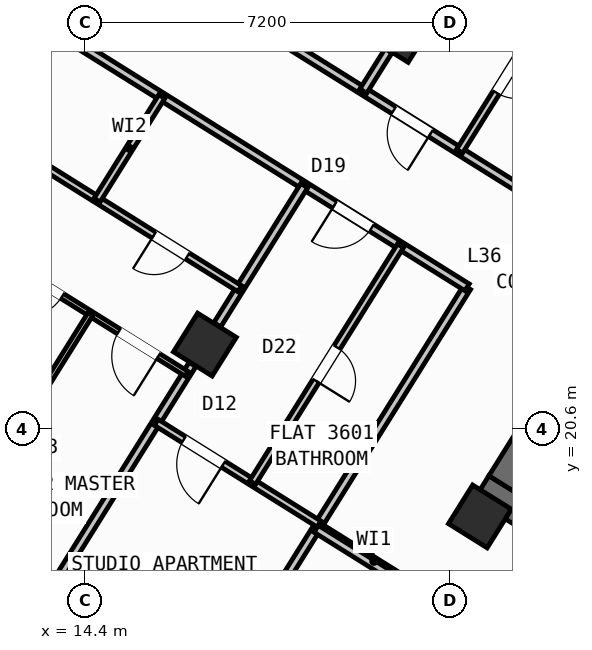
"""IFC4 building model, lengths in metres.
Left out: names, types, materials, properties, quantities, classifications, styles, units other than length and angle.
Written with IfcOpenShell. Run it as: python <this file> out.ifc"""

import sys

from ifc_helpers import new_model, si_unit, direction, frame, frame_2d, origin, origin_2d, place, context, subcontext, project, spatial, rectangle, hollow_rectangle, extrude, source, transform, mapped, element, fill, save


model = new_model("IFC4")
c1 = context("Model", 3, precision=1e-05, world=origin(), true_north=direction((0.0, 1.0)))
c2 = subcontext(c1, "Body", "Model", "MODEL_VIEW")
j1 = project(units=[si_unit("LENGTHUNIT", "METRE"), si_unit("PLANEANGLEUNIT", "RADIAN")], contexts=[c1])
p1 = place(None, origin())
s1 = spatial("IfcSite", under=j1, at=p1, CompositionType="ELEMENT")
p2 = place(p1, origin())
s2 = spatial("IfcBuilding", under=s1, at=p2, CompositionType="ELEMENT")
p3 = place(p2, frame((0.0, 0.0, 144.3)))
s3 = spatial("IfcBuildingStorey", under=s2, at=p3, CompositionType="ELEMENT", Elevation=144.3)
p4 = place(p3, frame((33.366, 12.477, 0.0), z_axis=(0.0, 0.0, 1.0), x_axis=(-0.848047359947, 0.529920442413, 0.0)))
e1 = element("IfcWall", 1, at=p4, inside=s3, PredefinedType="SHEAR", context=c2, shape_type="SweptSolid", body=[
    extrude(rectangle(XDim=13.14, YDim=0.55, at=frame_2d((6.57, 0.0))), origin(), (0.0, 0.0, 1.0), 3.35),
])
p5 = place(p3, frame((26.007, 24.976, 0.0), z_axis=(0.0, 0.0, 1.0), x_axis=(-0.529923795287, -0.848045264823, 0.0)))
e2 = element("IfcWall", 2, at=p5, inside=s3, PredefinedType="SHEAR", context=c2, shape_type="SweptSolid", body=[
    extrude(rectangle(XDim=6.425, YDim=0.55, at=frame_2d((3.212, 0.0))), origin(), (0.0, 0.0, 1.0), 3.35),
])
m1 = source(origin(), c2, "Body", "SweptSolid", [
    extrude(hollow_rectangle(XDim=0.9, YDim=0.9, WallThickness=0.036, at=origin_2d()), origin(), (0.0, 0.0, 1.0), 3.6),
])
for number, where, z_axis, x_axis in (
    (3, (22.191, 18.87, 0.0), (0.0, 0.0, 1.0), (-0.848, 0.53, 0.0)),
    (4, (20.632, 28.452, 0.0), (0.0, 0.0, 1.0), (-0.848, 0.53, 0.0)),
    (5, (16.764, 22.261, 0.0), (0.0, 0.0, 1.0), (-0.848, 0.53, 0.0)),
):
    element("IfcColumn", number, at=place(p3, frame(where, z_axis=z_axis, x_axis=x_axis)), inside=s3, PredefinedType="COLUMN", context=c2, shape_type="MappedRepresentation", body=[
        mapped(m1, transform((0.0, 0.0, 0.0), scale=1.0)),
    ])
p6 = place(p3, frame((29.268, 6.429, 0.0), z_axis=(0.0, 0.0, 1.0), x_axis=(-0.848049971435, 0.529916263149, 0.0)))
e6 = element("IfcWall", 6, at=p6, inside=s3, PredefinedType="STANDARD", context=c2, shape_type="SweptSolid", body=[
    extrude(rectangle(XDim=31.588, YDim=0.32, at=frame_2d((15.794, 0.0))), origin(), (0.0, 0.0, 1.0), 3.35),
])
p7 = place(p6, frame((16.362, 0.0, 0.0)))
e7 = element("IfcOpeningElement", 7, at=p7, cuts=e6, PredefinedType="OPENING", context=c2, shape_type="SweptSolid", body=[
    extrude(rectangle(XDim=1.2, YDim=2.15, at=frame_2d((0.6, 1.075))), frame((0.0, 0.17, 0.0), z_axis=(0.0, -1.0, 0.0), x_axis=(1.0, 0.0, 0.0)), (0.0, 0.0, 1.0), 0.34),
])
p8 = place(p6, frame((2.989, 0.0, 0.8)))
e8 = element("IfcOpeningElement", 8, at=p8, cuts=e6, PredefinedType="OPENING", context=c2, shape_type="SweptSolid", body=[
    extrude(rectangle(XDim=2.1, YDim=1.55, at=frame_2d((1.05, 0.775))), frame((0.0, 0.17, 0.0), z_axis=(0.0, -1.0, 0.0), x_axis=(1.0, 0.0, 0.0)), (0.0, 0.0, 1.0), 0.34),
])
p9 = place(p6, frame((8.359, 0.0, 0.8)))
e9 = element("IfcOpeningElement", 9, at=p9, cuts=e6, PredefinedType="OPENING", context=c2, shape_type="SweptSolid", body=[
    extrude(rectangle(XDim=2.1, YDim=1.55, at=frame_2d((1.05, 0.775))), frame((0.0, 0.17, 0.0), z_axis=(0.0, -1.0, 0.0), x_axis=(1.0, 0.0, 0.0)), (0.0, 0.0, 1.0), 0.34),
])
p10 = place(p6, frame((13.284, 0.0, 0.95)))
e10 = element("IfcOpeningElement", 10, at=p10, cuts=e6, PredefinedType="OPENING", context=c2, shape_type="SweptSolid", body=[
    extrude(rectangle(XDim=1.2, YDim=1.4, at=frame_2d((0.6, 0.7))), frame((0.0, 0.17, 0.0), z_axis=(0.0, -1.0, 0.0), x_axis=(1.0, 0.0, 0.0)), (0.0, 0.0, 1.0), 0.34),
])
p11 = place(p6, frame((29.188, 0.0, 0.95)))
e11 = element("IfcOpeningElement", 11, at=p11, cuts=e6, PredefinedType="OPENING", context=c2, shape_type="SweptSolid", body=[
    extrude(rectangle(XDim=1.2, YDim=1.4, at=frame_2d((0.6, 0.7))), frame((0.0, 0.17, 0.0), z_axis=(0.0, -1.0, 0.0), x_axis=(1.0, 0.0, 0.0)), (0.0, 0.0, 1.0), 0.34),
])
p12 = place(p6, frame((19.674, 0.0, 1.0)))
e12 = element("IfcOpeningElement", 12, at=p12, cuts=e6, PredefinedType="OPENING", context=c2, shape_type="SweptSolid", body=[
    extrude(rectangle(XDim=0.9, YDim=1.25, at=frame_2d((0.45, 0.625))), frame((0.0, 0.17, 0.0), z_axis=(0.0, -1.0, 0.0), x_axis=(1.0, 0.0, 0.0)), (0.0, 0.0, 1.0), 0.34),
])
p13 = place(p6, frame((21.896, 0.0, 1.0)))
e13 = element("IfcOpeningElement", 13, at=p13, cuts=e6, PredefinedType="OPENING", context=c2, shape_type="SweptSolid", body=[
    extrude(rectangle(XDim=0.9, YDim=1.25, at=frame_2d((0.45, 0.625))), frame((0.0, 0.17, 0.0), z_axis=(0.0, -1.0, 0.0), x_axis=(1.0, 0.0, 0.0)), (0.0, 0.0, 1.0), 0.34),
])
p14 = place(p6, frame((24.106, 0.0, 1.0)))
e14 = element("IfcOpeningElement", 14, at=p14, cuts=e6, PredefinedType="OPENING", context=c2, shape_type="SweptSolid", body=[
    extrude(rectangle(XDim=0.65, YDim=1.15, at=frame_2d((0.325, 0.575))), frame((0.0, 0.17, 0.0), z_axis=(0.0, -1.0, 0.0), x_axis=(1.0, 0.0, 0.0)), (0.0, 0.0, 1.0), 0.34),
])
p15 = place(p6, frame((26.366, 0.0, 1.0)))
e15 = element("IfcOpeningElement", 15, at=p15, cuts=e6, PredefinedType="OPENING", context=c2, shape_type="SweptSolid", body=[
    extrude(rectangle(XDim=0.9, YDim=1.25, at=frame_2d((0.45, 0.625))), frame((0.0, 0.17, 0.0), z_axis=(0.0, -1.0, 0.0), x_axis=(1.0, 0.0, 0.0)), (0.0, 0.0, 1.0), 0.34),
])
p16 = place(p3, frame((2.415, 23.452, 0.0), z_axis=(0.0, 0.0, 1.0), x_axis=(0.52991049553, 0.848053575387, 0.0)))
e16 = element("IfcWall", 16, at=p16, inside=s3, PredefinedType="STANDARD", context=c2, shape_type="SweptSolid", body=[
    extrude(rectangle(XDim=21.587, YDim=0.32, at=frame_2d((10.794, 0.0))), origin(), (0.0, 0.0, 1.0), 2.775),
])
p17 = place(p16, frame((2.356, 0.0, 0.8)))
e17 = element("IfcOpeningElement", 17, at=p17, cuts=e16, PredefinedType="OPENING", context=c2, shape_type="SweptSolid", body=[
    extrude(rectangle(XDim=2.1, YDim=1.55, at=frame_2d((1.05, 0.775))), frame((0.0, 0.17, 0.0), z_axis=(0.0, -1.0, 0.0), x_axis=(1.0, 0.0, 0.0)), (0.0, 0.0, 1.0), 0.34),
])
p18 = place(p16, frame((8.639, 0.0, 1.0)))
e18 = element("IfcOpeningElement", 18, at=p18, cuts=e16, PredefinedType="OPENING", context=c2, shape_type="SweptSolid", body=[
    extrude(rectangle(XDim=0.9, YDim=1.25, at=frame_2d((0.45, 0.625))), frame((0.0, 0.17, 0.0), z_axis=(0.0, -1.0, 0.0), x_axis=(1.0, 0.0, 0.0)), (0.0, 0.0, 1.0), 0.34),
])
p19 = place(p16, frame((17.744, 0.0, 0.85)))
e19 = element("IfcOpeningElement", 19, at=p19, cuts=e16, PredefinedType="OPENING", context=c2, shape_type="SweptSolid", body=[
    extrude(rectangle(XDim=1.5, YDim=1.5, at=frame_2d((0.75, 0.75))), frame((0.0, 0.17, 0.0), z_axis=(0.0, -1.0, 0.0), x_axis=(1.0, 0.0, 0.0)), (0.0, 0.0, 1.0), 0.34),
])
p20 = place(p3, frame((14.138, 41.825, 0.0), z_axis=(0.0, 0.0, 1.0), x_axis=(0.848046498049, -0.529921821731, 0.0)))
e20 = element("IfcWall", 20, at=p20, inside=s3, PredefinedType="STANDARD", context=c2, shape_type="SweptSolid", body=[
    extrude(rectangle(XDim=31.588, YDim=0.32, at=frame_2d((15.794, 0.0))), origin(), (0.0, 0.0, 1.0), 3.35),
])
p21 = place(p20, frame((2.949, 0.0, 0.0)))
e21 = element("IfcOpeningElement", 21, at=p21, cuts=e20, PredefinedType="OPENING", context=c2, shape_type="SweptSolid", body=[
    extrude(rectangle(XDim=1.05, YDim=2.15, at=frame_2d((0.525, 1.075))), frame((0.0, 0.17, 0.0), z_axis=(0.0, -1.0, 0.0), x_axis=(1.0, 0.0, 0.0)), (0.0, 0.0, 1.0), 0.34),
])
p22 = place(p20, frame((0.861, 0.0, 0.85)))
e22 = element("IfcOpeningElement", 22, at=p22, cuts=e20, PredefinedType="OPENING", context=c2, shape_type="SweptSolid", body=[
    extrude(rectangle(XDim=1.5, YDim=1.5, at=frame_2d((0.75, 0.75))), frame((0.0, 0.17, 0.0), z_axis=(0.0, -1.0, 0.0), x_axis=(1.0, 0.0, 0.0)), (0.0, 0.0, 1.0), 0.34),
])
p23 = place(p20, frame((8.494, 0.0, 0.85)))
e23 = element("IfcOpeningElement", 23, at=p23, cuts=e20, PredefinedType="OPENING", context=c2, shape_type="SweptSolid", body=[
    extrude(rectangle(XDim=1.8, YDim=1.5, at=frame_2d((0.9, 0.75))), frame((0.0, 0.17, 0.0), z_axis=(0.0, -1.0, 0.0), x_axis=(1.0, 0.0, 0.0)), (0.0, 0.0, 1.0), 0.34),
])
p24 = place(p20, frame((13.874, 0.0, 0.85)))
e24 = element("IfcOpeningElement", 24, at=p24, cuts=e20, PredefinedType="OPENING", context=c2, shape_type="SweptSolid", body=[
    extrude(rectangle(XDim=1.5, YDim=1.5, at=frame_2d((0.75, 0.75))), frame((0.0, 0.17, 0.0), z_axis=(0.0, -1.0, 0.0), x_axis=(1.0, 0.0, 0.0)), (0.0, 0.0, 1.0), 0.34),
])
p25 = place(p20, frame((17.104, 0.0, 1.0)))
e25 = element("IfcOpeningElement", 25, at=p25, cuts=e20, PredefinedType="OPENING", context=c2, shape_type="SweptSolid", body=[
    extrude(rectangle(XDim=0.9, YDim=1.25, at=frame_2d((0.45, 0.625))), frame((0.0, 0.17, 0.0), z_axis=(0.0, -1.0, 0.0), x_axis=(1.0, 0.0, 0.0)), (0.0, 0.0, 1.0), 0.34),
])
p26 = place(p20, frame((22.144, 0.0, 1.0)))
e26 = element("IfcOpeningElement", 26, at=p26, cuts=e20, PredefinedType="OPENING", context=c2, shape_type="SweptSolid", body=[
    extrude(rectangle(XDim=0.9, YDim=1.25, at=frame_2d((0.45, 0.625))), frame((0.0, 0.17, 0.0), z_axis=(0.0, -1.0, 0.0), x_axis=(1.0, 0.0, 0.0)), (0.0, 0.0, 1.0), 0.34),
])
p27 = place(p20, frame((27.744, 0.0, 1.0)))
e27 = element("IfcOpeningElement", 27, at=p27, cuts=e20, PredefinedType="OPENING", context=c2, shape_type="SweptSolid", body=[
    extrude(rectangle(XDim=0.9, YDim=1.25, at=frame_2d((0.45, 0.625))), frame((0.0, 0.17, 0.0), z_axis=(0.0, -1.0, 0.0), x_axis=(1.0, 0.0, 0.0)), (0.0, 0.0, 1.0), 0.34),
])
p28 = place(p3, frame((21.206, 17.292, 0.0), z_axis=(0.0, 0.0, 1.0), x_axis=(-0.848050851465, 0.529914854792, 0.0)))
e28 = element("IfcWall", 28, at=p28, inside=s3, PredefinedType="PARTITIONING", context=c2, shape_type="SweptSolid", body=[
    extrude(rectangle(XDim=2.61, YDim=0.16, at=frame_2d((1.305, 0.0))), origin(), (0.0, 0.0, 1.0), 3.34),
])
p29 = place(p3, frame((21.938, 23.391, 0.0), z_axis=(0.0, 0.0, 1.0), x_axis=(-0.529924725692, -0.848044683434, 0.0)))
e29 = element("IfcWall", 29, at=p29, inside=s3, PredefinedType="PARTITIONING", context=c2, shape_type="SweptSolid", body=[
    extrude(rectangle(XDim=10.35, YDim=0.16, at=frame_2d((5.175, 0.0))), origin(), (0.0, 0.0, 1.0), 3.34),
])
p30 = place(p3, frame((23.104, 25.256, 0.0), z_axis=(0.0, 0.0, 1.0), x_axis=(-0.848041752158, 0.529929416617, 0.0)))
e30 = element("IfcWall", 30, at=p30, inside=s3, PredefinedType="PARTITIONING", context=c2, shape_type="SweptSolid", body=[
    extrude(rectangle(XDim=16.73, YDim=0.16, at=frame_2d((8.365, 0.0))), origin(), (0.0, 0.0, 1.0), 3.34),
])
p31 = place(p30, frame((2.22, 0.0, 0.0)))
e31 = element("IfcOpeningElement", 31, at=p31, cuts=e30, PredefinedType="OPENING", context=c2, shape_type="SweptSolid", body=[
    extrude(rectangle(XDim=0.86, YDim=2.05, at=frame_2d((0.43, 1.025))), frame((0.0, 0.09, 0.0), z_axis=(0.0, -1.0, 0.0), x_axis=(1.0, 0.0, 0.0)), (0.0, 0.0, 1.0), 0.18),
])
p32 = place(p30, frame((12.084, 0.0, 0.0)))
e32 = element("IfcOpeningElement", 32, at=p32, cuts=e30, PredefinedType="OPENING", context=c2, shape_type="SweptSolid", body=[
    extrude(rectangle(XDim=1.0, YDim=2.1, at=frame_2d((0.5, 1.05))), frame((0.0, 0.09, 0.0), z_axis=(0.0, -1.0, 0.0), x_axis=(1.0, 0.0, 0.0)), (0.0, 0.0, 1.0), 0.18),
])
p33 = place(p3, frame((21.938, 23.391, 0.0), z_axis=(0.0, 0.0, 1.0), x_axis=(-0.848045850158, 0.529922858565, 0.0)))
e33 = element("IfcWall", 33, at=p33, inside=s3, PredefinedType="PARTITIONING", context=c2, shape_type="SweptSolid", body=[
    extrude(rectangle(XDim=16.73, YDim=0.16, at=frame_2d((8.365, 0.0))), origin(), (0.0, 0.0, 1.0), 3.34),
])
p34 = place(p33, frame((2.22, 0.0, 0.0)))
e34 = element("IfcOpeningElement", 34, at=p34, cuts=e33, PredefinedType="OPENING", context=c2, shape_type="SweptSolid", body=[
    extrude(rectangle(XDim=0.86, YDim=2.05, at=frame_2d((0.43, 1.025))), frame((0.0, 0.09, 0.0), z_axis=(0.0, -1.0, 0.0), x_axis=(1.0, 0.0, 0.0)), (0.0, 0.0, 1.0), 0.18),
])
p35 = place(p33, frame((14.22, 0.0, 0.0)))
e35 = element("IfcOpeningElement", 35, at=p35, cuts=e33, PredefinedType="OPENING", context=c2, shape_type="SweptSolid", body=[
    extrude(rectangle(XDim=1.0, YDim=2.1, at=frame_2d((0.5, 1.05))), frame((0.0, 0.09, 0.0), z_axis=(0.0, -1.0, 0.0), x_axis=(1.0, 0.0, 0.0)), (0.0, 0.0, 1.0), 0.18),
])
p36 = place(p3, frame((18.724, 25.399, 0.0), z_axis=(0.0, 0.0, 1.0), x_axis=(-0.529890499457, -0.848066069705, 0.0)))
e36 = element("IfcWall", 36, at=p36, inside=s3, PredefinedType="PARTITIONING", context=c2, shape_type="SweptSolid", body=[
    extrude(rectangle(XDim=3.238, YDim=0.16, at=frame_2d((1.619, 0.0))), origin(), (0.0, 0.0, 1.0), 2.775),
])
p37 = place(p3, frame((16.519, 21.87, 0.0), z_axis=(0.0, 0.0, 1.0), x_axis=(-0.529922447305, -0.848046107144, 0.0)))
e37 = element("IfcWall", 37, at=p37, inside=s3, PredefinedType="PARTITIONING", context=c2, shape_type="SweptSolid", body=[
    extrude(rectangle(XDim=5.451, YDim=0.16, at=frame_2d((2.726, 0.0))), origin(), (0.0, 0.0, 1.0), 2.775),
])
p38 = place(p3, frame((19.019, 18.718, 0.0), z_axis=(0.0, 0.0, 1.0), x_axis=(-0.848059820872, 0.529900500304, 0.0)))
e38 = element("IfcWall", 38, at=p38, inside=s3, PredefinedType="PLUMBINGWALL", context=c2, shape_type="SweptSolid", body=[
    extrude(rectangle(XDim=3.79, YDim=0.14, at=frame_2d((1.895, 0.0))), origin(), (0.0, 0.0, 1.0), 3.34),
])
p39 = place(p38, frame((2.23, 0.0, 0.0)))
e39 = element("IfcOpeningElement", 39, at=p39, cuts=e38, PredefinedType="OPENING", context=c2, shape_type="SweptSolid", body=[
    extrude(rectangle(XDim=0.92, YDim=2.08, at=frame_2d((0.46, 1.04))), frame((0.0, 0.08, 0.0), z_axis=(0.0, -1.0, 0.0), x_axis=(1.0, 0.0, 0.0)), (0.0, 0.0, 1.0), 0.16),
])
p40 = place(p3, frame((20.624, 24.212, 0.0), z_axis=(0.0, 0.0, 1.0), x_axis=(-0.529919283494, -0.848048084121, 0.0)))
e40 = element("IfcWall", 40, at=p40, inside=s3, PredefinedType="PLUMBINGWALL", context=c2, shape_type="SweptSolid", body=[
    extrude(rectangle(XDim=5.51, YDim=0.14, at=frame_2d((2.755, 0.0))), origin(), (0.0, 0.0, 1.0), 2.995),
])
p41 = place(p40, frame((2.365, 0.0, 0.0)))
e41 = element("IfcOpeningElement", 41, at=p41, cuts=e40, PredefinedType="OPENING", context=c2, shape_type="SweptSolid", body=[
    extrude(rectangle(XDim=0.78, YDim=2.05, at=frame_2d((0.39, 1.025))), frame((0.0, 0.08, 0.0), z_axis=(0.0, -1.0, 0.0), x_axis=(1.0, 0.0, 0.0)), (0.0, 0.0, 1.0), 0.16),
])
p42 = place(p3, frame((17.452, 23.364, 0.0), z_axis=(0.0, 0.0, 1.0), x_axis=(-0.848044326704, 0.52992529657, 0.0)))
e42 = element("IfcWall", 42, at=p42, inside=s3, PredefinedType="PLUMBINGWALL", context=c2, shape_type="SweptSolid", body=[
    extrude(rectangle(XDim=8.94, YDim=0.14, at=frame_2d((4.47, 0.0))), origin(), (0.0, 0.0, 1.0), 3.34),
])
p43 = place(p42, frame((5.087, 0.0, 0.0)))
e43 = element("IfcOpeningElement", 43, at=p43, cuts=e42, PredefinedType="OPENING", context=c2, shape_type="SweptSolid", body=[
    extrude(rectangle(XDim=0.78, YDim=2.05, at=frame_2d((0.39, 1.025))), frame((0.0, 0.08, 0.0), z_axis=(0.0, -1.0, 0.0), x_axis=(1.0, 0.0, 0.0)), (0.0, 0.0, 1.0), 0.16),
])
p44 = place(p42, frame((1.218, 0.0, 0.0)))
e44 = element("IfcOpeningElement", 44, at=p44, cuts=e42, PredefinedType="OPENING", context=c2, shape_type="SweptSolid", body=[
    extrude(rectangle(XDim=0.78, YDim=2.05, at=frame_2d((0.39, 1.025))), frame((0.0, 0.08, 0.0), z_axis=(0.0, -1.0, 0.0), x_axis=(1.0, 0.0, 0.0)), (0.0, 0.0, 1.0), 0.16),
])
p45 = place(p3, frame((15.913, 27.156, 0.0), z_axis=(0.0, 0.0, 1.0), x_axis=(-0.529935194983, -0.848038141311, 0.0)))
e45 = element("IfcWall", 45, at=p45, inside=s3, PredefinedType="PLUMBINGWALL", context=c2, shape_type="SweptSolid", body=[
    extrude(rectangle(XDim=2.41, YDim=0.14, at=frame_2d((1.205, 0.0))), origin(), (0.0, 0.0, 1.0), 3.34),
])
p46 = place(p3, frame((16.403, 21.685, 0.0), z_axis=(0.0, 0.0, 1.0), x_axis=(-0.848044326704, 0.52992529657, 0.0)))
e46 = element("IfcWall", 46, at=p46, inside=s3, PredefinedType="PARTITIONING", context=c2, shape_type="SweptSolid", body=[
    extrude(rectangle(XDim=8.94, YDim=0.11, at=frame_2d((4.47, 0.0))), origin(), (0.0, 0.0, 1.0), 3.34),
])
p47 = place(p46, frame((0.657, 0.0, 0.0)))
e47 = element("IfcOpeningElement", 47, at=p47, cuts=e46, PredefinedType="OPENING", context=c2, shape_type="SweptSolid", body=[
    extrude(rectangle(XDim=0.92, YDim=2.08, at=frame_2d((0.46, 1.04))), frame((0.0, 0.065, 0.0), z_axis=(0.0, -1.0, 0.0), x_axis=(1.0, 0.0, 0.0)), (0.0, 0.0, 1.0), 0.13),
])
p48 = place(p46, frame((2.893, 0.0, 0.0)))
e48 = element("IfcOpeningElement", 48, at=p48, cuts=e46, PredefinedType="OPENING", context=c2, shape_type="SweptSolid", body=[
    extrude(rectangle(XDim=0.92, YDim=2.08, at=frame_2d((0.46, 1.04))), frame((0.0, 0.065, 0.0), z_axis=(0.0, -1.0, 0.0), x_axis=(1.0, 0.0, 0.0)), (0.0, 0.0, 1.0), 0.13),
])
p49 = place(p46, frame((5.008, 0.0, 0.0)))
e49 = element("IfcOpeningElement", 49, at=p49, cuts=e46, PredefinedType="OPENING", context=c2, shape_type="SweptSolid", body=[
    extrude(rectangle(XDim=0.92, YDim=2.08, at=frame_2d((0.46, 1.04))), frame((0.0, 0.065, 0.0), z_axis=(0.0, -1.0, 0.0), x_axis=(1.0, 0.0, 0.0)), (0.0, 0.0, 1.0), 0.13),
])
p50 = place(p46, frame((7.363, 0.0, 0.0)))
e50 = element("IfcOpeningElement", 50, at=p50, cuts=e46, PredefinedType="OPENING", context=c2, shape_type="SweptSolid", body=[
    extrude(rectangle(XDim=0.92, YDim=2.08, at=frame_2d((0.46, 1.04))), frame((0.0, 0.065, 0.0), z_axis=(0.0, -1.0, 0.0), x_axis=(1.0, 0.0, 0.0)), (0.0, 0.0, 1.0), 0.13),
])
p51 = place(p3, frame((14.508, 22.869, 0.0), z_axis=(0.0, 0.0, 1.0), x_axis=(-0.529900466106, -0.848059842241, 0.0)))
e51 = element("IfcWall", 51, at=p51, inside=s3, PredefinedType="PARTITIONING", context=c2, shape_type="SweptSolid", body=[
    extrude(rectangle(XDim=6.24, YDim=0.11, at=frame_2d((3.12, 0.0))), origin(), (0.0, 0.0, 1.0), 2.995),
])
p52 = place(p3, frame((20.387, 28.06, 0.0), z_axis=(0.0, 0.0, 1.0), x_axis=(-0.529952145338, -0.848027548876, 0.0)))
e52 = element("IfcWall", 52, at=p52, inside=s3, PredefinedType="PARTITIONING", context=c2, shape_type="SweptSolid", body=[
    extrude(rectangle(XDim=0.938, YDim=0.16, at=frame_2d((0.469, 0.0))), origin(), (0.0, 0.0, 1.0), 2.775),
])
p53 = place(p3, frame((23.65, 29.054, 0.0), z_axis=(0.0, 0.0, 1.0), x_axis=(-0.529898896701, -0.848060822863, 0.0)))
e53 = element("IfcWall", 53, at=p53, inside=s3, PredefinedType="PLUMBINGWALL", context=c2, shape_type="SweptSolid", body=[
    extrude(rectangle(XDim=3.51, YDim=0.14, at=frame_2d((1.755, 0.0))), origin(), (0.0, 0.0, 1.0), 2.995),
])
p54 = place(p53, frame((1.365, 0.0, 0.0)))
e54 = element("IfcOpeningElement", 54, at=p54, cuts=e53, PredefinedType="OPENING", context=c2, shape_type="SweptSolid", body=[
    extrude(rectangle(XDim=0.78, YDim=2.05, at=frame_2d((0.39, 1.025))), frame((0.0, 0.08, 0.0), z_axis=(0.0, -1.0, 0.0), x_axis=(1.0, 0.0, 0.0)), (0.0, 0.0, 1.0), 0.16),
])
p55 = place(p3, frame((32.164, 10.374, 0.0), z_axis=(0.0, 0.0, 1.0), x_axis=(-0.848044107957, 0.529925646633, 0.0)))
e55 = element("IfcWall", 55, at=p55, inside=s3, PredefinedType="PARTITIONING", context=c2, shape_type="SweptSolid", body=[
    extrude(rectangle(XDim=15.57, YDim=0.16, at=frame_2d((7.785, 0.0))), origin(), (0.0, 0.0, 1.0), 3.34),
])
p56 = place(p55, frame((10.83, 0.0, 0.0)))
e56 = element("IfcOpeningElement", 56, at=p56, cuts=e55, PredefinedType="OPENING", context=c2, shape_type="SweptSolid", body=[
    extrude(rectangle(XDim=1.0, YDim=2.1, at=frame_2d((0.5, 1.05))), frame((0.0, 0.09, 0.0), z_axis=(0.0, -1.0, 0.0), x_axis=(1.0, 0.0, 0.0)), (0.0, 0.0, 1.0), 0.18),
])
m2 = source(origin(), c2, "Body", "SweptSolid", [
    extrude(rectangle(XDim=0.86, YDim=2.05, at=frame_2d((0.43, 1.025))), frame((0.0, 0.025, 0.0), z_axis=(0.0, -1.0, 0.0), x_axis=(1.0, 0.0, 0.0)), (0.0, 0.0, 1.0), 0.05),
])
p57 = place(p34, origin())
e57 = element("IfcDoor", 57, at=p57, inside=s3, OperationType="SINGLE_SWING_RIGHT", PredefinedType="DOOR", context=c2, shape_type="MappedRepresentation", body=[
    mapped(m2, transform((0.0, 0.0, 0.0), scale=1.0)),
])
fill(e34, e57)
m3 = source(origin(), c2, "Body", "SweptSolid", [
    extrude(rectangle(XDim=0.92, YDim=2.08, at=frame_2d((0.46, 1.04))), frame((0.0, 0.025, 0.0), z_axis=(0.0, -1.0, 0.0), x_axis=(1.0, 0.0, 0.0)), (0.0, 0.0, 1.0), 0.05),
])
p58 = place(p39, origin())
e58 = element("IfcDoor", 58, at=p58, inside=s3, OperationType="SINGLE_SWING_LEFT", PredefinedType="DOOR", context=c2, shape_type="MappedRepresentation", body=[
    mapped(m3, transform((0.0, 0.0, 0.0), scale=1.0)),
])
fill(e39, e58)
m4 = source(origin(), c2, "Body", "SweptSolid", [
    extrude(rectangle(XDim=0.78, YDim=2.05, at=frame_2d((0.39, 1.025))), frame((0.0, 0.025, 0.0), z_axis=(0.0, -1.0, 0.0), x_axis=(1.0, 0.0, 0.0)), (0.0, 0.0, 1.0), 0.05),
])
p59 = place(p41, origin())
e59 = element("IfcDoor", 59, at=p59, inside=s3, OperationType="SINGLE_SWING_RIGHT", PredefinedType="DOOR", context=c2, shape_type="MappedRepresentation", body=[
    mapped(m4, transform((0.0, 0.0, 0.0), scale=1.0)),
])
fill(e41, e59)
p60 = place(p44, origin())
e60 = element("IfcDoor", 60, at=p60, inside=s3, OperationType="SINGLE_SWING_RIGHT", PredefinedType="DOOR", context=c2, shape_type="MappedRepresentation", body=[
    mapped(m4, transform((0.0, 0.0, 0.0), scale=1.0)),
])
fill(e44, e60)
p61 = place(p47, origin())
e61 = element("IfcDoor", 61, at=p61, inside=s3, OperationType="SINGLE_SWING_LEFT", PredefinedType="DOOR", context=c2, shape_type="MappedRepresentation", body=[
    mapped(m3, transform((0.0, 0.0, 0.0), scale=1.0)),
])
fill(e47, e61)
p62 = place(p48, origin())
e62 = element("IfcDoor", 62, at=p62, inside=s3, OperationType="SINGLE_SWING_RIGHT", PredefinedType="DOOR", context=c2, shape_type="MappedRepresentation", body=[
    mapped(m3, transform((0.0, 0.0, 0.0), scale=1.0)),
])
fill(e48, e62)
p63 = place(p31, origin())
e63 = element("IfcDoor", 63, at=p63, inside=s3, OperationType="SINGLE_SWING_LEFT", PredefinedType="DOOR", context=c2, shape_type="MappedRepresentation", body=[
    mapped(m2, transform((0.0, 0.0, 0.0), scale=1.0)),
])
fill(e31, e63)
p64 = place(p54, origin())
e64 = element("IfcDoor", 64, at=p64, inside=s3, OperationType="SINGLE_SWING_LEFT", PredefinedType="DOOR", context=c2, shape_type="MappedRepresentation", body=[
    mapped(m4, transform((0.0, 0.0, 0.0), scale=1.0)),
])
fill(e54, e64)
save(model, sys.argv[1])
